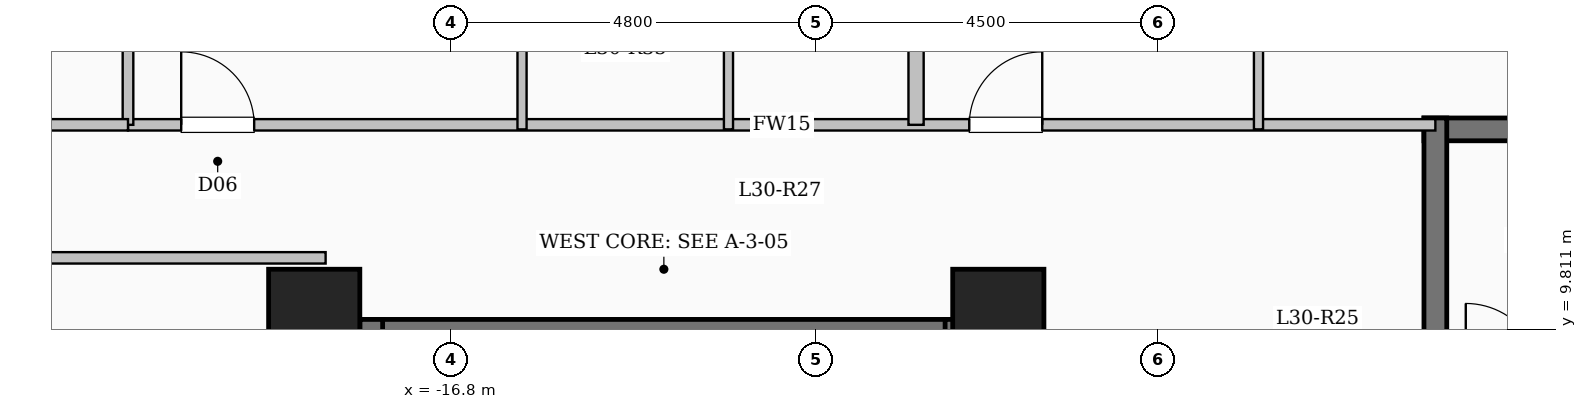
"""IFC4 building model, lengths in metres.
Left out: names, types, materials, properties, quantities, classifications, styles, units other than length and angle.
Written with IfcOpenShell. Run it as: python <this file> out.ifc"""

import sys

from ifc_helpers import new_model, si_unit, direction, frame, frame_2d, origin, origin_2d, place, context, subcontext, project, spatial, rectangle, extrude, element, fill, save


model = new_model("IFC4")
c1 = context("Model", 3, precision=1e-05, world=origin(), true_north=direction((0.0, 1.0)))
c2 = subcontext(c1, "Body", "Model", "MODEL_VIEW")
j1 = project(units=[si_unit("LENGTHUNIT", "METRE"), si_unit("PLANEANGLEUNIT", "RADIAN")], contexts=[c1])
p1 = place(None, origin())
s1 = spatial("IfcSite", under=j1, at=p1, CompositionType="ELEMENT")
p2 = place(p1, origin())
s2 = spatial("IfcBuilding", under=s1, at=p2, CompositionType="ELEMENT")
p3 = place(p2, frame((0.0, 0.0, 111.8)))
s3 = spatial("IfcBuildingStorey", under=s2, at=p3, CompositionType="ELEMENT", Elevation=111.8)
for number, where, z_axis, x_axis in (
    (1, (-9.6, 10.0, 0.0), (0.0, 0.0, 1.0), (1.0, 0.0, 0.0)),
    (2, (-18.6, 10.0, 0.0), (0.0, 0.0, 1.0), (1.0, 0.0, 0.0)),
):
    element("IfcColumn", number, at=place(p3, frame(where, z_axis=z_axis, x_axis=x_axis)), inside=s3, PredefinedType="COLUMN", context=c2, shape_type="SweptSolid", body=[
        extrude(rectangle(XDim=1.2, YDim=1.2, at=origin_2d()), origin(), (0.0, 0.0, 1.0), 3.35),
    ])
p4 = place(p3, frame((-18.0, 9.79, 0.0), z_axis=(0.0, 0.0, 1.0), x_axis=(1.0, 0.0, 0.0)))
e3 = element("IfcWall", 3, at=p4, inside=s3, PredefinedType="SHEAR", context=c2, shape_type="SweptSolid", body=[
    extrude(rectangle(XDim=8.0, YDim=0.3, at=frame_2d((4.0, 0.0))), origin(), (0.0, 0.0, 1.0), 3.35),
])
for number, where, z_axis, x_axis in (
    (4, (-17.85, 6.35, 0.0), (0.0, 0.0, 1.0), (0.0, 1.0, 0.0)),
    (5, (-10.15, 6.35, 0.0), (0.0, 0.0, 1.0), (0.0, 1.0, 0.0)),
):
    element("IfcWall", number, at=place(p3, frame(where, z_axis=z_axis, x_axis=x_axis)), inside=s3, PredefinedType="SHEAR", context=c2, shape_type="SweptSolid", body=[
        extrude(rectangle(XDim=3.59, YDim=0.3, at=frame_2d((1.795, 0.0))), origin(), (0.0, 0.0, 1.0), 3.35),
    ])
p5 = place(p3, frame((-4.0, 12.44, 0.0), z_axis=(0.0, 0.0, 1.0), x_axis=(1.0, 0.0, 0.0)))
e6 = element("IfcWall", 6, at=p5, inside=s3, PredefinedType="SHEAR", context=c2, shape_type="SweptSolid", body=[
    extrude(rectangle(XDim=8.0, YDim=0.3, at=frame_2d((4.0, 0.0))), origin(), (0.0, 0.0, 1.0), 3.35),
])
p6 = place(p3, frame((-3.85, 9.0, 0.0), z_axis=(0.0, 0.0, 1.0), x_axis=(0.0, 1.0, 0.0)))
e7 = element("IfcWall", 7, at=p6, inside=s3, PredefinedType="SHEAR", context=c2, shape_type="SweptSolid", body=[
    extrude(rectangle(XDim=3.59, YDim=0.3, at=frame_2d((1.795, 0.0))), origin(), (0.0, 0.0, 1.0), 3.35),
])
p7 = place(p3, frame((-21.05, 12.5, 0.0), z_axis=(0.0, 0.0, 1.0), x_axis=(1.0, 0.0, 0.0)))
e8 = element("IfcWall", 8, at=p7, inside=s3, PredefinedType="PARTITIONING", context=c2, shape_type="SweptSolid", body=[
    extrude(rectangle(XDim=17.2, YDim=0.15, at=frame_2d((8.6, 0.0))), origin(), (0.0, 0.0, 1.0), 3.1),
])
p8 = place(p7, frame((0.7, 0.0, 0.0)))
e9 = element("IfcOpeningElement", 9, at=p8, cuts=e8, PredefinedType="OPENING", context=c2, shape_type="SweptSolid", body=[
    extrude(rectangle(XDim=0.96, YDim=2.15, at=frame_2d((0.48, 1.075))), frame((0.0, 0.085, 0.0), z_axis=(0.0, -1.0, 0.0), x_axis=(1.0, 0.0, 0.0)), (0.0, 0.0, 1.0), 0.17),
])
p9 = place(p7, frame((11.068, 0.0, 0.0)))
e10 = element("IfcOpeningElement", 10, at=p9, cuts=e8, PredefinedType="OPENING", context=c2, shape_type="SweptSolid", body=[
    extrude(rectangle(XDim=0.96, YDim=2.15, at=frame_2d((0.48, 1.075))), frame((0.0, 0.085, 0.0), z_axis=(0.0, -1.0, 0.0), x_axis=(1.0, 0.0, 0.0)), (0.0, 0.0, 1.0), 0.17),
])
p10 = place(p3, frame((-10.682, 12.5, 0.0), z_axis=(0.0, 0.0, 1.0), x_axis=(0.0, 1.0, 0.0)))
e11 = element("IfcWall", 11, at=p10, inside=s3, PredefinedType="SOLIDWALL", context=c2, shape_type="SweptSolid", body=[
    extrude(rectangle(XDim=9.678, YDim=0.2, at=frame_2d((4.839, 0.0))), origin(), (0.0, 0.0, 1.0), 3.1),
])
p11 = place(p3, frame((-15.866, 12.44, 0.0), z_axis=(0.0, 0.0, 1.0), x_axis=(0.0, 1.0, 0.0)))
e12 = element("IfcWall", 12, at=p11, inside=s3, PredefinedType="PARTITIONING", context=c2, shape_type="SweptSolid", body=[
    extrude(rectangle(XDim=9.66, YDim=0.12, at=frame_2d((4.83, 0.0))), origin(), (0.0, 0.0, 1.0), 3.1),
])
p12 = place(p11, frame((2.905, 0.0, 0.0)))
e13 = element("IfcOpeningElement", 13, at=p12, cuts=e12, PredefinedType="OPENING", context=c2, shape_type="SweptSolid", body=[
    extrude(rectangle(XDim=1.08, YDim=2.15, at=frame_2d((0.54, 1.075))), frame((0.0, 0.07, 0.0), z_axis=(0.0, -1.0, 0.0), x_axis=(1.0, 0.0, 0.0)), (0.0, 0.0, 1.0), 0.14),
])
p13 = place(p3, frame((-13.15, 12.44, 0.0), z_axis=(0.0, 0.0, 1.0), x_axis=(0.0, 1.0, 0.0)))
e14 = element("IfcWall", 14, at=p13, inside=s3, PredefinedType="PARTITIONING", context=c2, shape_type="SweptSolid", body=[
    extrude(rectangle(XDim=2.62, YDim=0.12, at=frame_2d((1.31, 0.0))), origin(), (0.0, 0.0, 1.0), 3.1),
])
p14 = place(p3, frame((-6.177, 12.44, 0.0), z_axis=(0.0, 0.0, 1.0), x_axis=(0.0, 1.0, 0.0)))
e15 = element("IfcWall", 15, at=p14, inside=s3, PredefinedType="PARTITIONING", context=c2, shape_type="SweptSolid", body=[
    extrude(rectangle(XDim=10.85, YDim=0.12, at=frame_2d((5.425, 0.0))), origin(), (0.0, 0.0, 1.0), 3.1),
])
p15 = place(p14, frame((3.075, 0.0, 0.0)))
e16 = element("IfcOpeningElement", 16, at=p15, cuts=e15, PredefinedType="OPENING", context=c2, shape_type="SweptSolid", body=[
    extrude(rectangle(XDim=1.08, YDim=2.15, at=frame_2d((0.54, 1.075))), frame((0.0, 0.07, 0.0), z_axis=(0.0, -1.0, 0.0), x_axis=(1.0, 0.0, 0.0)), (0.0, 0.0, 1.0), 0.14),
])
p16 = place(p3, frame((-26.88, 10.75, 0.0), z_axis=(0.0, 0.0, 1.0), x_axis=(1.0, 0.0, 0.0)))
e17 = element("IfcWall", 17, at=p16, inside=s3, PredefinedType="PARTITIONING", context=c2, shape_type="SweptSolid", body=[
    extrude(rectangle(XDim=8.43, YDim=0.15, at=frame_2d((4.215, 0.0))), origin(), (0.0, 0.0, 1.0), 3.1),
])
p17 = place(p3, frame((-21.05, 12.5, 0.0), z_axis=(0.0, 0.0, 1.0), x_axis=(0.0, 1.0, 0.0)))
e18 = element("IfcWall", 18, at=p17, inside=s3, PredefinedType="PARTITIONING", context=c2, shape_type="SweptSolid", body=[
    extrude(rectangle(XDim=5.35, YDim=0.14, at=frame_2d((2.675, 0.0))), origin(), (0.0, 0.0, 1.0), 3.1),
])
p18 = place(p3, frame((-26.88, 12.5, 0.0), z_axis=(0.0, 0.0, 1.0), x_axis=(1.0, 0.0, 0.0)))
e19 = element("IfcWall", 19, at=p18, inside=s3, PredefinedType="PARTITIONING", context=c2, shape_type="SweptSolid", body=[
    extrude(rectangle(XDim=5.83, YDim=0.15, at=frame_2d((2.915, 0.0))), origin(), (0.0, 0.0, 1.0), 3.1),
])
p19 = place(p18, frame((2.44, 0.0, 0.0)))
e20 = element("IfcOpeningElement", 20, at=p19, cuts=e19, PredefinedType="OPENING", context=c2, shape_type="SweptSolid", body=[
    extrude(rectangle(XDim=0.95, YDim=2.15, at=frame_2d((0.475, 1.075))), frame((0.0, 0.085, 0.0), z_axis=(0.0, -1.0, 0.0), x_axis=(1.0, 0.0, 0.0)), (0.0, 0.0, 1.0), 0.17),
])
p20 = place(p8, origin())
e21 = element("IfcDoor", 21, at=p20, inside=s3, OperationType="SINGLE_SWING_LEFT", PredefinedType="DOOR", context=c2, shape_type="SweptSolid", body=[
    extrude(rectangle(XDim=0.96, YDim=2.15, at=frame_2d((0.48, 1.075))), frame((0.0, 0.025, 0.0), z_axis=(0.0, -1.0, 0.0), x_axis=(1.0, 0.0, 0.0)), (0.0, 0.0, 1.0), 0.05),
])
fill(e9, e21)
p21 = place(p9, origin())
e22 = element("IfcDoor", 22, at=p21, inside=s3, OperationType="SINGLE_SWING_RIGHT", PredefinedType="DOOR", context=c2, shape_type="SweptSolid", body=[
    extrude(rectangle(XDim=0.96, YDim=2.15, at=frame_2d((0.48, 1.075))), frame((0.0, 0.025, 0.0), z_axis=(0.0, -1.0, 0.0), x_axis=(1.0, 0.0, 0.0)), (0.0, 0.0, 1.0), 0.05),
])
fill(e10, e22)
save(model, sys.argv[1])
